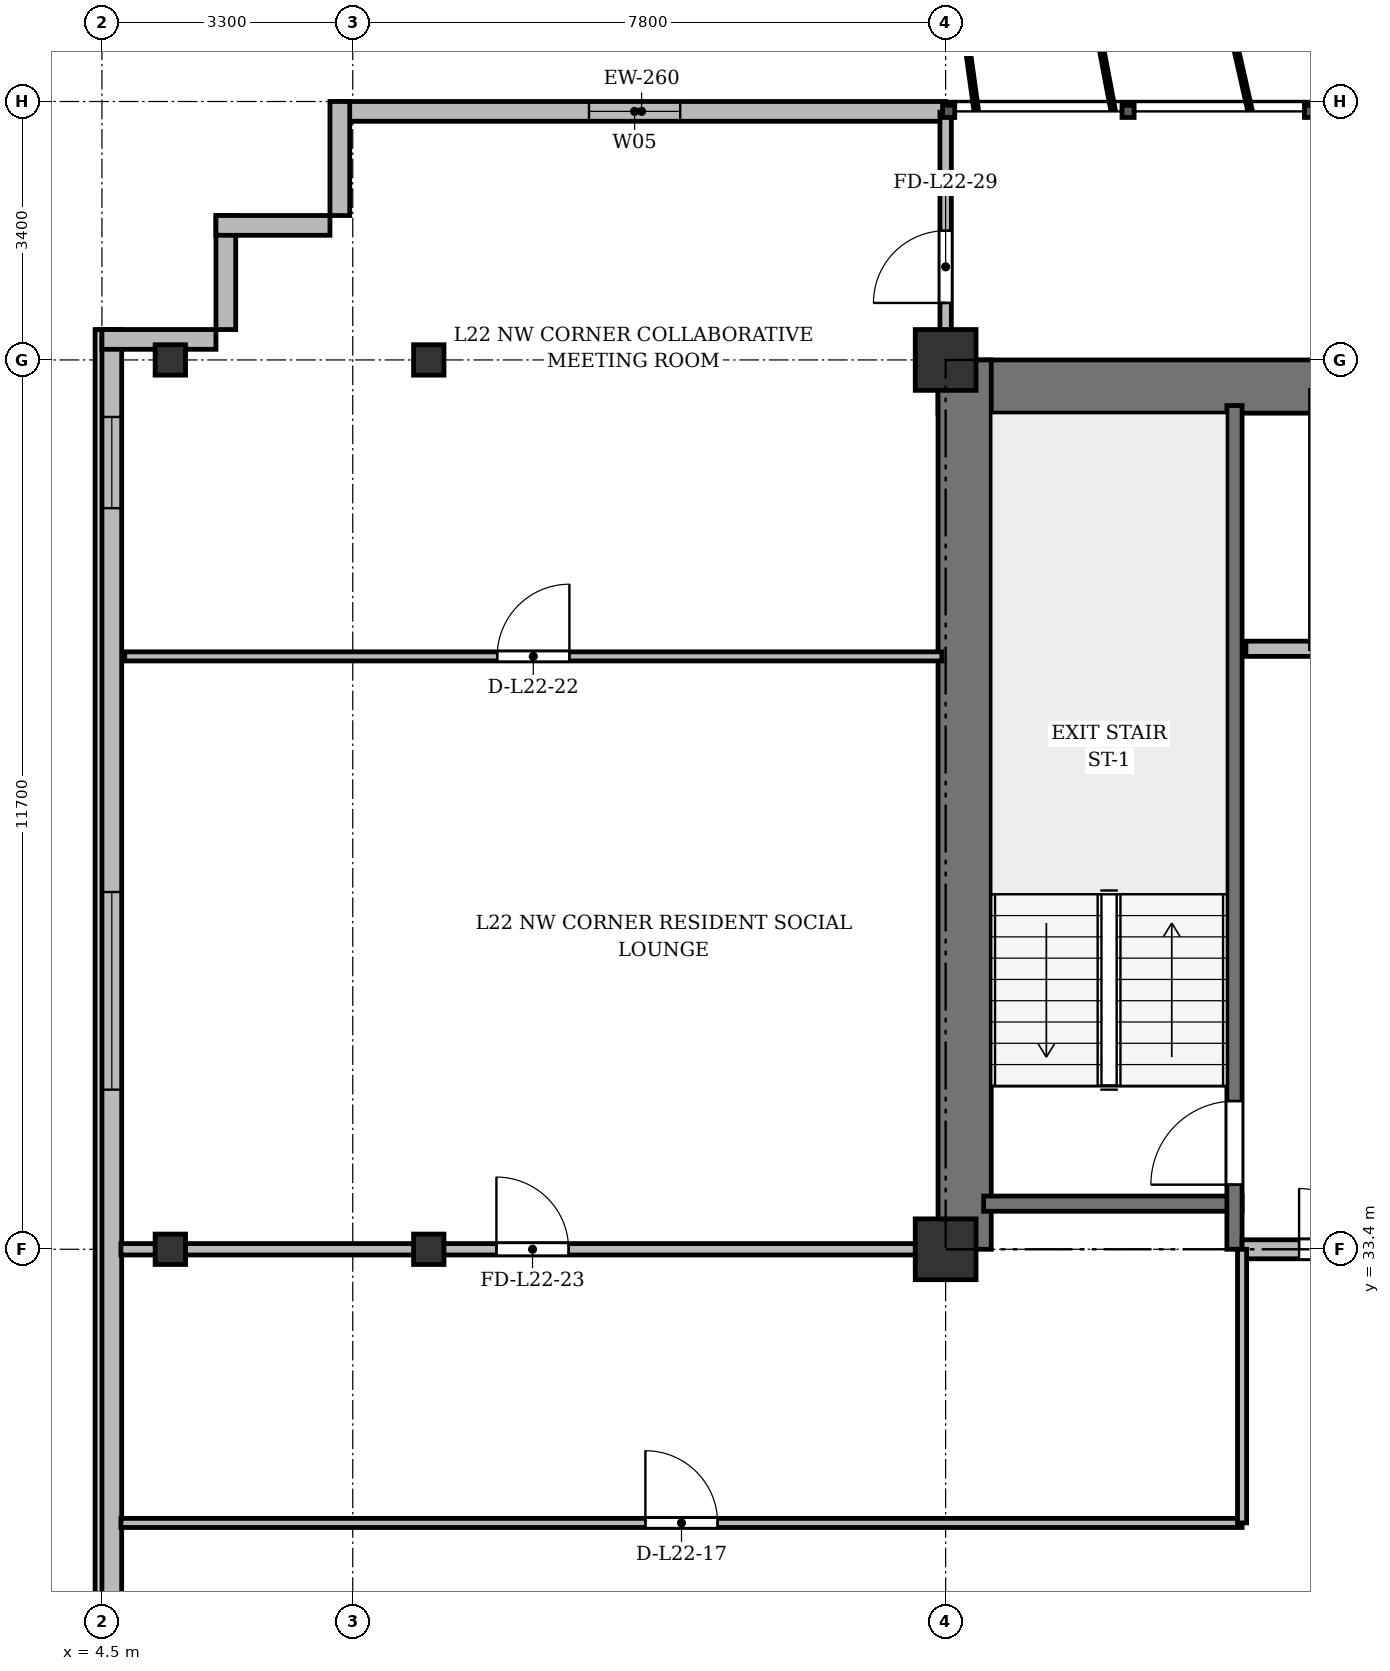
"""IFC4 building model, lengths in metres.
Left out: names, types, materials, properties, quantities, classifications, styles, units other than length and angle.
Written with IfcOpenShell. Run it as: python <this file> out.ifc"""

import sys

from ifc_helpers import new_model, si_unit, direction, frame, frame_2d, origin, origin_2d, place, context, subcontext, project, spatial, rectangle, i_section, extrude, source, transform, mapped, element, fill, save


model = new_model("IFC4")
c1 = context("Model", 3, precision=1e-05, world=origin(), true_north=direction((0.0, 1.0)))
c2 = subcontext(c1, "Body", "Model", "MODEL_VIEW")
j1 = project(units=[si_unit("LENGTHUNIT", "METRE"), si_unit("PLANEANGLEUNIT", "RADIAN")], contexts=[c1])
p1 = place(None, origin())
s1 = spatial("IfcSite", under=j1, at=p1, CompositionType="ELEMENT")
p2 = place(p1, origin())
s2 = spatial("IfcBuilding", under=s1, at=p2, CompositionType="ELEMENT")
p3 = place(p2, frame((0.0, 0.0, 88.9)))
s3 = spatial("IfcBuildingStorey", under=s2, at=p3, CompositionType="ELEMENT", Elevation=88.9)
m1 = source(origin(), c2, "Body", "SweptSolid", [
    extrude(i_section(OverallWidth=0.4, OverallDepth=0.4, WebThickness=0.022, FlangeThickness=0.035, at=origin_2d()), origin(), (0.0, 0.0, 1.0), 3.6),
])
for number, where, z_axis, x_axis in (
    (1, (5.4, 33.4, 0.0), (0.0, 0.0, 1.0), (1.0, 0.0, 0.0)),
    (2, (5.4, 45.1, 0.0), (0.0, 0.0, 1.0), (1.0, 0.0, 0.0)),
    (3, (8.8, 33.4, 0.0), (0.0, 0.0, 1.0), (1.0, 0.0, 0.0)),
    (4, (8.8, 45.1, 0.0), (0.0, 0.0, 1.0), (1.0, 0.0, 0.0)),
):
    element("IfcColumn", number, at=place(p3, frame(where, z_axis=z_axis, x_axis=x_axis)), inside=s3, PredefinedType="COLUMN", context=c2, shape_type="MappedRepresentation", body=[
        mapped(m1, transform((0.0, 0.0, 0.0), x_axis=(1.0, 0.0, 0.0), y_axis=(0.0, 1.0, 0.0), z_axis=(0.0, 0.0, 1.0), scale=1.0)),
    ])
m2 = source(origin(), c2, "Body", "SweptSolid", [
    extrude(rectangle(XDim=0.8, YDim=0.8, at=origin_2d()), origin(), (0.0, 0.0, 1.0), 3.6),
])
for number, where, z_axis, x_axis in (
    (5, (15.6, 33.4, 0.0), (0.0, 0.0, 1.0), (1.0, 0.0, 0.0)),
    (6, (15.6, 45.1, 0.0), (0.0, 0.0, 1.0), (1.0, 0.0, 0.0)),
):
    element("IfcColumn", number, at=place(p3, frame(where, z_axis=z_axis, x_axis=x_axis)), inside=s3, PredefinedType="COLUMN", context=c2, shape_type="MappedRepresentation", body=[
        mapped(m2, transform((0.0, 0.0, 0.0), x_axis=(1.0, 0.0, 0.0), y_axis=(0.0, 1.0, 0.0), z_axis=(0.0, 0.0, 1.0), scale=1.0)),
    ])
p4 = place(p3, frame((7.6, 48.37, 0.0), z_axis=(0.0, 0.0, 1.0), x_axis=(1.0, 0.0, 0.0)))
e7 = element("IfcWall", 7, at=p4, inside=s3, PredefinedType="SOLIDWALL", context=c2, shape_type="SweptSolid", body=[
    extrude(rectangle(XDim=8.0, YDim=0.26, at=frame_2d((4.0, 0.0))), origin(), (0.0, 0.0, 1.0), 3.34),
])
p5 = place(p4, frame((3.308, 0.0, 0.9)))
e8 = element("IfcOpeningElement", 8, at=p5, cuts=e7, PredefinedType="OPENING", context=c2, shape_type="SweptSolid", body=[
    extrude(rectangle(XDim=1.2, YDim=1.65, at=frame_2d((0.6, 0.825))), frame((0.0, 0.14, 0.0), z_axis=(0.0, -1.0, 0.0), x_axis=(1.0, 0.0, 0.0)), (0.0, 0.0, 1.0), 0.28),
])
p6 = place(p3, frame((4.63, 5.9, 0.0), z_axis=(0.0, 0.0, 1.0), x_axis=(0.0, 1.0, 0.0)))
e9 = element("IfcWall", 9, at=p6, inside=s3, PredefinedType="SOLIDWALL", context=c2, shape_type="SweptSolid", body=[
    extrude(rectangle(XDim=39.6, YDim=0.26, at=frame_2d((19.8, 0.0))), origin(), (0.0, 0.0, 1.0), 3.34),
])
p7 = place(p6, frame((1.45, 0.0, 0.92)))
e10 = element("IfcOpeningElement", 10, at=p7, cuts=e9, PredefinedType="OPENING", context=c2, shape_type="SweptSolid", body=[
    extrude(rectangle(XDim=1.2, YDim=1.65, at=frame_2d((0.6, 0.825))), frame((0.0, 0.14, 0.0), z_axis=(0.0, -1.0, 0.0), x_axis=(1.0, 0.0, 0.0)), (0.0, 0.0, 1.0), 0.28),
])
p8 = place(p6, frame((4.2, 0.0, 0.92)))
e11 = element("IfcOpeningElement", 11, at=p8, cuts=e9, PredefinedType="OPENING", context=c2, shape_type="SweptSolid", body=[
    extrude(rectangle(XDim=2.6, YDim=1.9, at=frame_2d((1.3, 0.95))), frame((0.0, 0.14, 0.0), z_axis=(0.0, -1.0, 0.0), x_axis=(1.0, 0.0, 0.0)), (0.0, 0.0, 1.0), 0.28),
])
p9 = place(p6, frame((8.4, 0.0, 0.92)))
e12 = element("IfcOpeningElement", 12, at=p9, cuts=e9, PredefinedType="OPENING", context=c2, shape_type="SweptSolid", body=[
    extrude(rectangle(XDim=2.6, YDim=1.9, at=frame_2d((1.3, 0.95))), frame((0.0, 0.14, 0.0), z_axis=(0.0, -1.0, 0.0), x_axis=(1.0, 0.0, 0.0)), (0.0, 0.0, 1.0), 0.28),
])
p10 = place(p6, frame((15.6, 0.0, 0.92)))
e13 = element("IfcOpeningElement", 13, at=p10, cuts=e9, PredefinedType="OPENING", context=c2, shape_type="SweptSolid", body=[
    extrude(rectangle(XDim=2.6, YDim=1.9, at=frame_2d((1.3, 0.95))), frame((0.0, 0.14, 0.0), z_axis=(0.0, -1.0, 0.0), x_axis=(1.0, 0.0, 0.0)), (0.0, 0.0, 1.0), 0.28),
])
p11 = place(p6, frame((29.6, 0.0, 0.92)))
e14 = element("IfcOpeningElement", 14, at=p11, cuts=e9, PredefinedType="OPENING", context=c2, shape_type="SweptSolid", body=[
    extrude(rectangle(XDim=2.6, YDim=1.9, at=frame_2d((1.3, 0.95))), frame((0.0, 0.14, 0.0), z_axis=(0.0, -1.0, 0.0), x_axis=(1.0, 0.0, 0.0)), (0.0, 0.0, 1.0), 0.28),
])
p12 = place(p6, frame((37.25, 0.0, 0.92)))
e15 = element("IfcOpeningElement", 15, at=p12, cuts=e9, PredefinedType="OPENING", context=c2, shape_type="SweptSolid", body=[
    extrude(rectangle(XDim=1.2, YDim=1.65, at=frame_2d((0.6, 0.825))), frame((0.0, 0.14, 0.0), z_axis=(0.0, -1.0, 0.0), x_axis=(1.0, 0.0, 0.0)), (0.0, 0.0, 1.0), 0.28),
])
p13 = place(p3, frame((4.5, 45.37, 0.0), z_axis=(0.0, 0.0, 1.0), x_axis=(1.0, 0.0, 0.0)))
e16 = element("IfcWall", 16, at=p13, inside=s3, PredefinedType="SOLIDWALL", context=c2, shape_type="SweptSolid", body=[
    extrude(rectangle(XDim=1.5, YDim=0.26, at=frame_2d((0.75, 0.0))), origin(), (0.0, 0.0, 1.0), 2.752),
])
for number, where, z_axis, x_axis in (
    (17, (6.13, 45.5, 0.0), (0.0, 0.0, 1.0), (0.0, 1.0, 0.0)),
    (18, (6.0, 46.87, 0.0), (0.0, 0.0, 1.0), (1.0, 0.0, 0.0)),
    (19, (7.63, 47.0, 0.0), (0.0, 0.0, 1.0), (0.0, 1.0, 0.0)),
):
    element("IfcWall", number, at=place(p3, frame(where, z_axis=z_axis, x_axis=x_axis)), inside=s3, PredefinedType="SOLIDWALL", context=c2, shape_type="SweptSolid", body=[
        extrude(rectangle(XDim=1.5, YDim=0.26, at=frame_2d((0.75, 0.0))), origin(), (0.0, 0.0, 1.0), 3.34),
    ])
p14 = place(p3, frame((15.5, 44.75, 0.0), z_axis=(0.0, 0.0, 1.0), x_axis=(1.0, 0.0, 0.0)))
e20 = element("IfcWall", 20, at=p14, inside=s3, PredefinedType="SHEAR", context=c2, shape_type="SweptSolid", body=[
    extrude(rectangle(XDim=43.4, YDim=0.7, at=frame_2d((21.7, 0.0))), origin(), (0.0, 0.0, 1.0), 3.34),
])
p15 = place(p3, frame((15.85, 33.4, 0.0), z_axis=(0.0, 0.0, 1.0), x_axis=(0.0, 1.0, 0.0)))
e21 = element("IfcWall", 21, at=p15, inside=s3, PredefinedType="SHEAR", context=c2, shape_type="SweptSolid", body=[
    extrude(rectangle(XDim=11.7, YDim=0.7, at=frame_2d((5.85, 0.0))), origin(), (0.0, 0.0, 1.0), 3.34),
])
p16 = place(p3, frame((16.1, 34.0, 0.0), z_axis=(0.0, 0.0, 1.0), x_axis=(1.0, 0.0, 0.0)))
e22 = element("IfcWall", 22, at=p16, inside=s3, PredefinedType="SHEAR", context=c2, shape_type="SweptSolid", body=[
    extrude(rectangle(XDim=3.4, YDim=0.2, at=frame_2d((1.7, 0.0))), origin(), (0.0, 0.0, 1.0), 3.34),
])
p17 = place(p3, frame((19.4, 33.4, 0.0), z_axis=(0.0, 0.0, 1.0), x_axis=(0.0, 1.0, 0.0)))
e23 = element("IfcWall", 23, at=p17, inside=s3, PredefinedType="SHEAR", context=c2, shape_type="SweptSolid", body=[
    extrude(rectangle(XDim=11.1, YDim=0.2, at=frame_2d((5.55, 0.0))), origin(), (0.0, 0.0, 1.0), 3.34),
])
p18 = place(p17, frame((0.85, 0.0, 0.0)))
e24 = element("IfcOpeningElement", 24, at=p18, cuts=e23, PredefinedType="OPENING", context=c2, shape_type="SweptSolid", body=[
    extrude(rectangle(XDim=1.1, YDim=2.15, at=frame_2d((0.55, 1.075))), frame((0.0, 0.11, 0.0), z_axis=(0.0, -1.0, 0.0), x_axis=(1.0, 0.0, 0.0)), (0.0, 0.0, 1.0), 0.22),
])
p19 = place(p3, frame((19.55, 41.3, 0.0), z_axis=(0.0, 0.0, 1.0), x_axis=(1.0, 0.0, 0.0)))
e25 = element("IfcWall", 25, at=p19, inside=s3, PredefinedType="SOLIDWALL", context=c2, shape_type="SweptSolid", body=[
    extrude(rectangle(XDim=6.75, YDim=0.2, at=frame_2d((3.375, 0.0))), origin(), (0.0, 0.0, 1.0), 3.34),
])
p20 = place(p19, frame((1.7, 0.0, 0.0)))
e26 = element("IfcOpeningElement", 26, at=p20, cuts=e25, PredefinedType="OPENING", context=c2, shape_type="SweptSolid", body=[
    extrude(rectangle(XDim=1.1, YDim=2.15, at=frame_2d((0.55, 1.075))), frame((0.0, 0.11, 0.0), z_axis=(0.0, -1.0, 0.0), x_axis=(1.0, 0.0, 0.0)), (0.0, 0.0, 1.0), 0.22),
])
p21 = place(p19, frame((4.4, 0.0, 0.0)))
e27 = element("IfcOpeningElement", 27, at=p21, cuts=e25, PredefinedType="OPENING", context=c2, shape_type="SweptSolid", body=[
    extrude(rectangle(XDim=1.1, YDim=2.15, at=frame_2d((0.55, 1.075))), frame((0.0, 0.11, 0.0), z_axis=(0.0, -1.0, 0.0), x_axis=(1.0, 0.0, 0.0)), (0.0, 0.0, 1.0), 0.22),
])
p22 = place(p3, frame((19.5, 33.4, 0.0), z_axis=(0.0, 0.0, 1.0), x_axis=(1.0, 0.0, 0.0)))
e28 = element("IfcWall", 28, at=p22, inside=s3, PredefinedType="PARTITIONING", context=c2, shape_type="SweptSolid", body=[
    extrude(rectangle(XDim=6.8, YDim=0.25, at=frame_2d((3.4, 0.0))), origin(), (0.0, 0.0, 1.0), 2.752),
])
p23 = place(p22, frame((0.75, 0.0, 0.0)))
e29 = element("IfcOpeningElement", 29, at=p23, cuts=e28, PredefinedType="OPENING", context=c2, shape_type="SweptSolid", body=[
    extrude(rectangle(XDim=1.6, YDim=2.2, at=frame_2d((0.8, 1.1))), frame((0.0, 0.135, 0.0), z_axis=(0.0, -1.0, 0.0), x_axis=(1.0, 0.0, 0.0)), (0.0, 0.0, 1.0), 0.27),
])
p24 = place(p3, frame((4.75, 29.8, 0.0), z_axis=(0.0, 0.0, 1.0), x_axis=(1.0, 0.0, 0.0)))
e30 = element("IfcWall", 30, at=p24, inside=s3, PredefinedType="PARTITIONING", context=c2, shape_type="SweptSolid", body=[
    extrude(rectangle(XDim=14.75, YDim=0.12, at=frame_2d((7.375, 0.0))), origin(), (0.0, 0.0, 1.0), 2.84),
])
p25 = place(p24, frame((6.9, 0.0, 0.0)))
e31 = element("IfcOpeningElement", 31, at=p25, cuts=e30, PredefinedType="OPENING", context=c2, shape_type="SweptSolid", body=[
    extrude(rectangle(XDim=0.95, YDim=2.15, at=frame_2d((0.475, 1.075))), frame((0.0, 0.07, 0.0), z_axis=(0.0, -1.0, 0.0), x_axis=(1.0, 0.0, 0.0)), (0.0, 0.0, 1.0), 0.14),
])
p26 = place(p3, frame((19.5, 29.8, 0.0), z_axis=(0.0, 0.0, 1.0), x_axis=(0.0, 1.0, 0.0)))
e32 = element("IfcWall", 32, at=p26, inside=s3, PredefinedType="PARTITIONING", context=c2, shape_type="SweptSolid", body=[
    extrude(rectangle(XDim=3.6, YDim=0.12, at=frame_2d((1.8, 0.0))), origin(), (0.0, 0.0, 1.0), 2.752),
])
p27 = place(p3, frame((4.8, 41.2, 0.0), z_axis=(0.0, 0.0, 1.0), x_axis=(1.0, 0.0, 0.0)))
e33 = element("IfcWall", 33, at=p27, inside=s3, PredefinedType="PARTITIONING", context=c2, shape_type="SweptSolid", body=[
    extrude(rectangle(XDim=10.75, YDim=0.12, at=frame_2d((5.375, 0.0))), origin(), (0.0, 0.0, 1.0), 2.84),
])
p28 = place(p27, frame((4.9, 0.0, 0.0)))
e34 = element("IfcOpeningElement", 34, at=p28, cuts=e33, PredefinedType="OPENING", context=c2, shape_type="SweptSolid", body=[
    extrude(rectangle(XDim=0.95, YDim=2.15, at=frame_2d((0.475, 1.075))), frame((0.0, 0.07, 0.0), z_axis=(0.0, -1.0, 0.0), x_axis=(1.0, 0.0, 0.0)), (0.0, 0.0, 1.0), 0.14),
])
p29 = place(p3, frame((4.75, 33.4, 0.0), z_axis=(0.0, 0.0, 1.0), x_axis=(1.0, 0.0, 0.0)))
e35 = element("IfcWall", 35, at=p29, inside=s3, PredefinedType="PARTITIONING", context=c2, shape_type="SweptSolid", body=[
    extrude(rectangle(XDim=10.85, YDim=0.15, at=frame_2d((5.425, 0.0))), origin(), (0.0, 0.0, 1.0), 2.752),
])
p30 = place(p29, frame((4.94, 0.0, 0.0)))
e36 = element("IfcOpeningElement", 36, at=p30, cuts=e35, PredefinedType="OPENING", context=c2, shape_type="SweptSolid", body=[
    extrude(rectangle(XDim=0.95, YDim=2.15, at=frame_2d((0.475, 1.075))), frame((0.0, 0.085, 0.0), z_axis=(0.0, -1.0, 0.0), x_axis=(1.0, 0.0, 0.0)), (0.0, 0.0, 1.0), 0.17),
])
p31 = place(p3, frame((15.6, 44.75, 0.0), z_axis=(0.0, 0.0, 1.0), x_axis=(0.0, 1.0, 0.0)))
e37 = element("IfcWall", 37, at=p31, inside=s3, PredefinedType="PARTITIONING", context=c2, shape_type="SweptSolid", body=[
    extrude(rectangle(XDim=3.61, YDim=0.15, at=frame_2d((1.805, 0.0))), origin(), (0.0, 0.0, 1.0), 2.84),
])
p32 = place(p31, frame((1.1, 0.0, 0.0)))
e38 = element("IfcOpeningElement", 38, at=p32, cuts=e37, PredefinedType="OPENING", context=c2, shape_type="SweptSolid", body=[
    extrude(rectangle(XDim=0.95, YDim=2.15, at=frame_2d((0.475, 1.075))), frame((0.0, 0.085, 0.0), z_axis=(0.0, -1.0, 0.0), x_axis=(1.0, 0.0, 0.0)), (0.0, 0.0, 1.0), 0.17),
])
m3 = source(origin(), c2, "Body", "SweptSolid", [
    extrude(rectangle(XDim=1.2, YDim=1.65, at=frame_2d((0.6, 0.825))), frame((0.0, 0.03, 0.0), z_axis=(0.0, -1.0, 0.0), x_axis=(1.0, 0.0, 0.0)), (0.0, 0.0, 1.0), 0.06),
])
p33 = place(p5, origin())
e39 = element("IfcWindow", 39, at=p33, inside=s3, PartitioningType="SINGLE_PANEL", PredefinedType="WINDOW", context=c2, shape_type="MappedRepresentation", body=[
    mapped(m3, transform((0.0, 0.0, 0.0), x_axis=(1.0, 0.0, 0.0), y_axis=(0.0, 1.0, 0.0), z_axis=(0.0, 0.0, 1.0), scale=1.0)),
])
fill(e8, e39)
m4 = source(origin(), c2, "Body", "SweptSolid", [
    extrude(rectangle(XDim=2.6, YDim=1.9, at=frame_2d((1.3, 0.95))), frame((0.0, 0.03, 0.0), z_axis=(0.0, -1.0, 0.0), x_axis=(1.0, 0.0, 0.0)), (0.0, 0.0, 1.0), 0.06),
])
p34 = place(p11, origin())
e40 = element("IfcWindow", 40, at=p34, inside=s3, PartitioningType="SINGLE_PANEL", PredefinedType="WINDOW", context=c2, shape_type="MappedRepresentation", body=[
    mapped(m4, transform((0.0, 0.0, 0.0), x_axis=(1.0, 0.0, 0.0), y_axis=(0.0, 1.0, 0.0), z_axis=(0.0, 0.0, 1.0), scale=1.0)),
])
fill(e14, e40)
p35 = place(p12, origin())
e41 = element("IfcWindow", 41, at=p35, inside=s3, PartitioningType="SINGLE_PANEL", PredefinedType="WINDOW", context=c2, shape_type="MappedRepresentation", body=[
    mapped(m3, transform((0.0, 0.0, 0.0), x_axis=(1.0, 0.0, 0.0), y_axis=(0.0, 1.0, 0.0), z_axis=(0.0, 0.0, 1.0), scale=1.0)),
])
fill(e15, e41)
m5 = source(origin(), c2, "Body", "SweptSolid", [
    extrude(rectangle(XDim=1.1, YDim=2.15, at=frame_2d((0.55, 1.075))), frame((0.0, 0.025, 0.0), z_axis=(0.0, -1.0, 0.0), x_axis=(1.0, 0.0, 0.0)), (0.0, 0.0, 1.0), 0.05),
])
p36 = place(p18, origin())
e42 = element("IfcDoor", 42, at=p36, inside=s3, OperationType="SINGLE_SWING_LEFT", PredefinedType="DOOR", context=c2, shape_type="MappedRepresentation", body=[
    mapped(m5, transform((0.0, 0.0, 0.0), x_axis=(1.0, 0.0, 0.0), y_axis=(0.0, 1.0, 0.0), z_axis=(0.0, 0.0, 1.0), scale=1.0)),
])
fill(e24, e42)
m6 = source(origin(), c2, "Body", "SweptSolid", [
    extrude(rectangle(XDim=1.6, YDim=2.2, at=frame_2d((0.8, 1.1))), frame((0.0, 0.025, 0.0), z_axis=(0.0, -1.0, 0.0), x_axis=(1.0, 0.0, 0.0)), (0.0, 0.0, 1.0), 0.05),
])
p37 = place(p23, origin())
e43 = element("IfcDoor", 43, at=p37, inside=s3, OperationType="DOUBLE_DOOR_SINGLE_SWING", PredefinedType="DOOR", context=c2, shape_type="MappedRepresentation", body=[
    mapped(m6, transform((0.0, 0.0, 0.0), x_axis=(1.0, 0.0, 0.0), y_axis=(0.0, 1.0, 0.0), z_axis=(0.0, 0.0, 1.0), scale=1.0)),
])
fill(e29, e43)
m7 = source(origin(), c2, "Body", "SweptSolid", [
    extrude(rectangle(XDim=0.95, YDim=2.15, at=frame_2d((0.475, 1.075))), frame((0.0, 0.025, 0.0), z_axis=(0.0, -1.0, 0.0), x_axis=(1.0, 0.0, 0.0)), (0.0, 0.0, 1.0), 0.05),
])
p38 = place(p25, origin())
e44 = element("IfcDoor", 44, at=p38, inside=s3, OperationType="SINGLE_SWING_LEFT", PredefinedType="DOOR", context=c2, shape_type="MappedRepresentation", body=[
    mapped(m7, transform((0.0, 0.0, 0.0), x_axis=(1.0, 0.0, 0.0), y_axis=(0.0, 1.0, 0.0), z_axis=(0.0, 0.0, 1.0), scale=1.0)),
])
fill(e31, e44)
p39 = place(p28, origin())
e45 = element("IfcDoor", 45, at=p39, inside=s3, OperationType="SINGLE_SWING_RIGHT", PredefinedType="DOOR", context=c2, shape_type="MappedRepresentation", body=[
    mapped(m7, transform((0.0, 0.0, 0.0), x_axis=(1.0, 0.0, 0.0), y_axis=(0.0, 1.0, 0.0), z_axis=(0.0, 0.0, 1.0), scale=1.0)),
])
fill(e34, e45)
p40 = place(p30, origin())
e46 = element("IfcDoor", 46, at=p40, inside=s3, OperationType="SINGLE_SWING_LEFT", PredefinedType="DOOR", context=c2, shape_type="MappedRepresentation", body=[
    mapped(m7, transform((0.0, 0.0, 0.0), x_axis=(1.0, 0.0, 0.0), y_axis=(0.0, 1.0, 0.0), z_axis=(0.0, 0.0, 1.0), scale=1.0)),
])
fill(e36, e46)
p41 = place(p32, origin())
e47 = element("IfcDoor", 47, at=p41, inside=s3, OperationType="SINGLE_SWING_LEFT", PredefinedType="DOOR", context=c2, shape_type="MappedRepresentation", body=[
    mapped(m7, transform((0.0, 0.0, 0.0), x_axis=(1.0, 0.0, 0.0), y_axis=(0.0, 1.0, 0.0), z_axis=(0.0, 0.0, 1.0), scale=1.0)),
])
fill(e38, e47)
save(model, sys.argv[1])
